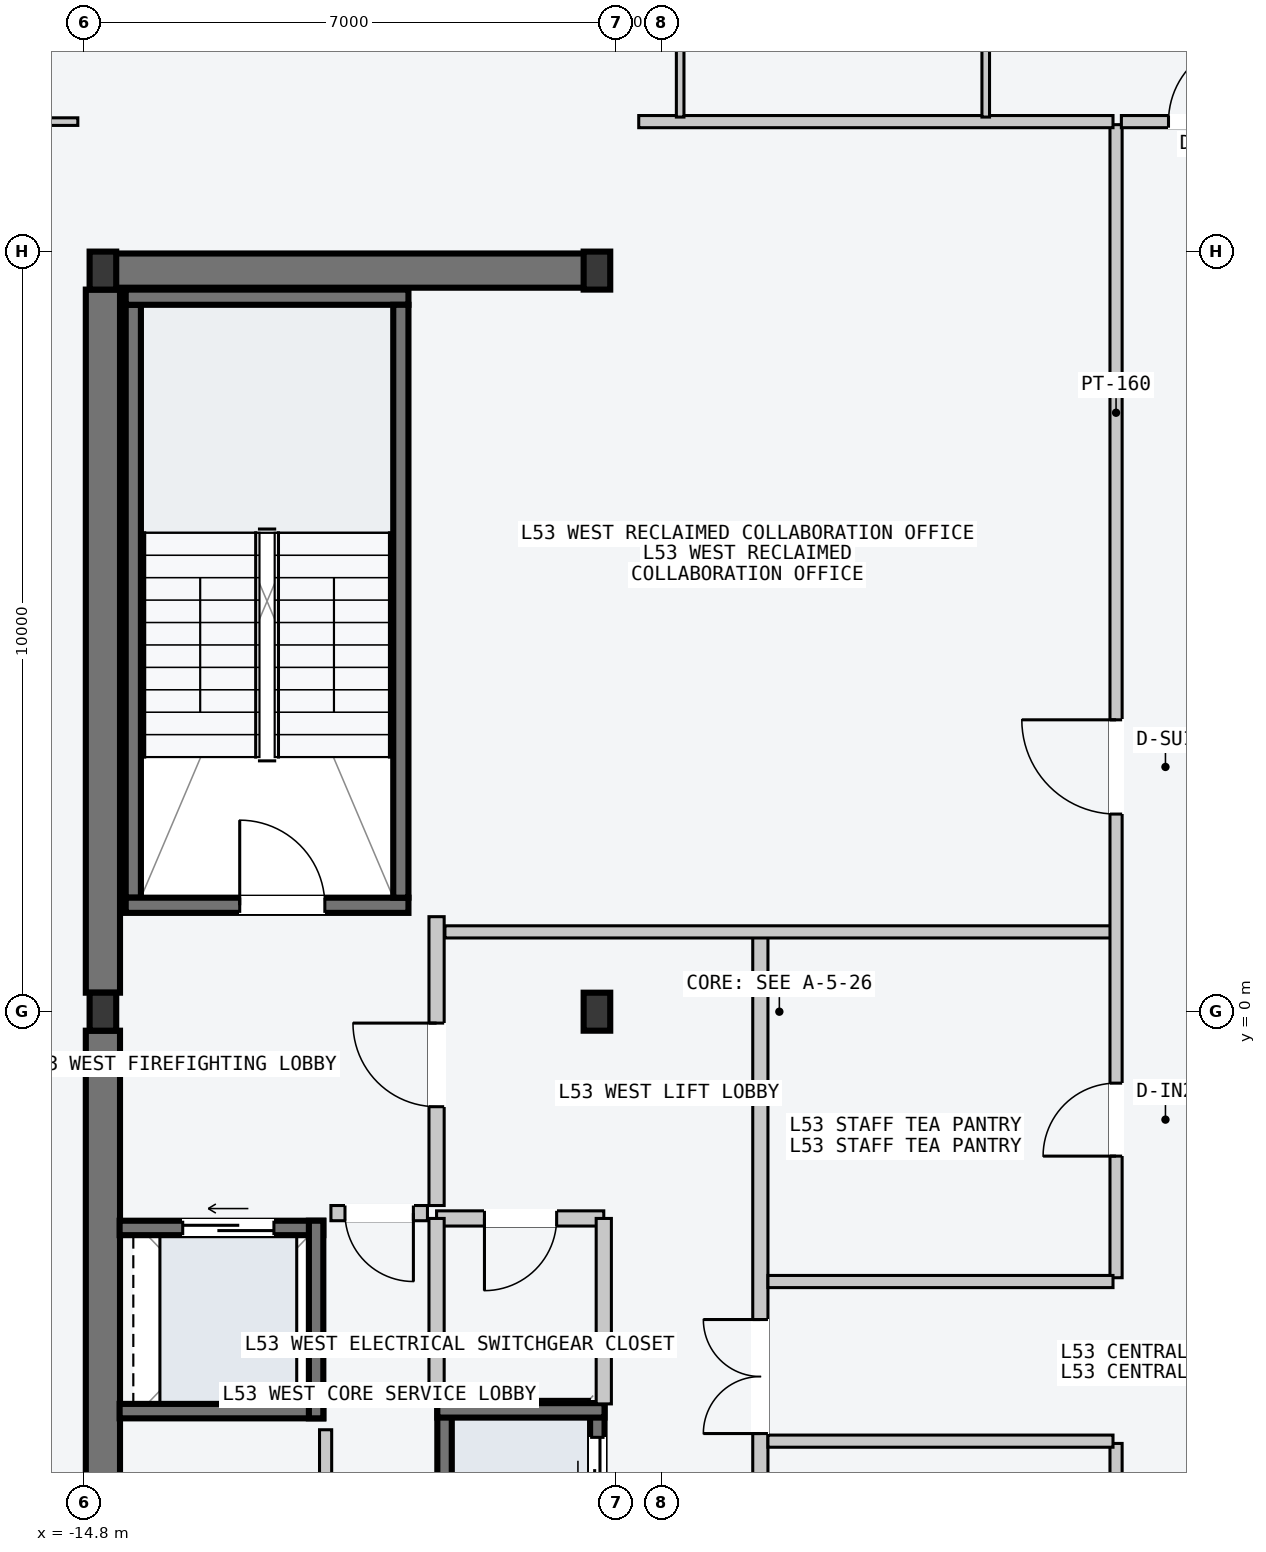
"""IFC4 building model, lengths in metres.
Left out: names, types, materials, properties, quantities, classifications, styles, units other than length and angle.
Written with IfcOpenShell. Run it as: python <this file> out.ifc"""

import sys

from ifc_helpers import new_model, si_unit, direction, frame, frame_2d, origin, origin_2d, place, context, subcontext, project, spatial, rectangle, i_section, extrude, element, fill, save


model = new_model("IFC4")
c1 = context("Model", 3, precision=1e-05, world=origin(), true_north=direction((0.0, 1.0)))
c2 = subcontext(c1, "Body", "Model", "MODEL_VIEW")
j1 = project(units=[si_unit("LENGTHUNIT", "METRE"), si_unit("PLANEANGLEUNIT", "RADIAN")], contexts=[c1])
p1 = place(None, origin())
s1 = spatial("IfcSite", under=j1, at=p1, CompositionType="ELEMENT")
p2 = place(p1, origin())
s2 = spatial("IfcBuilding", under=s1, at=p2, CompositionType="ELEMENT")
p3 = place(p2, frame((0.0, 0.0, 201.9)))
s3 = spatial("IfcBuildingStorey", under=s2, at=p3, CompositionType="ELEMENT", Elevation=201.9)
p4 = place(p3, frame((-14.53, 9.75, -0.2), z_axis=(0.0, 0.0, 1.0), x_axis=(1.0, 0.0, 0.0)))
e1 = element("IfcWall", 1, at=p4, inside=s3, PredefinedType="SHEAR", context=c2, shape_type="SweptSolid", body=[
    extrude(rectangle(XDim=6.46, YDim=0.45, at=frame_2d((3.23, 0.0))), origin(), (0.0, 0.0, 1.0), 3.6),
])
for number, where, z_axis, x_axis in (
    (2, (-14.55, -9.5, -0.2), (0.0, 0.0, 1.0), (0.0, 1.0, 0.0)),
    (3, (-14.55, 0.25, -0.2), (0.0, 0.0, 1.0), (0.0, 1.0, 0.0)),
):
    element("IfcWall", number, at=place(p3, frame(where, z_axis=z_axis, x_axis=x_axis)), inside=s3, PredefinedType="SHEAR", context=c2, shape_type="SweptSolid", body=[
        extrude(rectangle(XDim=9.25, YDim=0.45, at=frame_2d((4.625, 0.0))), origin(), (0.0, 0.0, 1.0), 3.6),
    ])
p5 = place(p3, frame((-14.15, 1.5, -0.2), z_axis=(0.0, 0.0, 1.0), x_axis=(0.0, 1.0, 0.0)))
e4 = element("IfcWall", 4, at=p5, inside=s3, PredefinedType="SOLIDWALL", context=c2, shape_type="SweptSolid", body=[
    extrude(rectangle(XDim=7.8, YDim=0.2, at=frame_2d((3.9, 0.0))), origin(), (0.0, 0.0, 1.0), 3.6),
])
p6 = place(p3, frame((-14.25, 1.4, -0.2), z_axis=(0.0, 0.0, 1.0), x_axis=(1.0, 0.0, 0.0)))
e5 = element("IfcWall", 5, at=p6, inside=s3, PredefinedType="SOLIDWALL", context=c2, shape_type="SweptSolid", body=[
    extrude(rectangle(XDim=3.72, YDim=0.2, at=frame_2d((1.86, 0.0))), origin(), (0.0, 0.0, 1.0), 3.6),
])
p7 = place(p6, frame((1.5, 0.0, 0.2)))
e6 = element("IfcOpeningElement", 6, at=p7, cuts=e5, PredefinedType="OPENING", context=c2, shape_type="SweptSolid", body=[
    extrude(rectangle(XDim=1.12, YDim=2.18, at=frame_2d((0.56, 1.09))), frame((0.0, 0.11, 0.0), z_axis=(0.0, -1.0, 0.0), x_axis=(1.0, 0.0, 0.0)), (0.0, 0.0, 1.0), 0.22),
])
p8 = place(p3, frame((-14.25, 9.4, -0.2), z_axis=(0.0, 0.0, 1.0), x_axis=(1.0, 0.0, 0.0)))
e7 = element("IfcWall", 7, at=p8, inside=s3, PredefinedType="SOLIDWALL", context=c2, shape_type="SweptSolid", body=[
    extrude(rectangle(XDim=3.72, YDim=0.2, at=frame_2d((1.86, 0.0))), origin(), (0.0, 0.0, 1.0), 3.6),
])
p9 = place(p3, frame((-10.63, 1.5, -0.2), z_axis=(0.0, 0.0, 1.0), x_axis=(0.0, 1.0, 0.0)))
e8 = element("IfcWall", 8, at=p9, inside=s3, PredefinedType="SOLIDWALL", context=c2, shape_type="SweptSolid", body=[
    extrude(rectangle(XDim=7.8, YDim=0.2, at=frame_2d((3.9, 0.0))), origin(), (0.0, 0.0, 1.0), 3.6),
])
for number, where, z_axis, x_axis in (
    (9, (-14.55, 0.0, 0.0), (0.0, 0.0, 1.0), (1.0, 0.0, 0.0)),
    (10, (-14.55, 9.75, 0.0), (0.0, 0.0, 1.0), (1.0, 0.0, 0.0)),
    (11, (-8.05, 0.0, 0.0), (0.0, 0.0, 1.0), (1.0, 0.0, 0.0)),
    (12, (-8.05, 9.75, 0.0), (0.0, 0.0, 1.0), (1.0, 0.0, 0.0)),
):
    element("IfcColumn", number, at=place(p3, frame(where, z_axis=z_axis, x_axis=x_axis)), inside=s3, PredefinedType="COLUMN", context=c2, shape_type="SweptSolid", body=[
        extrude(i_section(OverallWidth=0.35, OverallDepth=0.5, WebThickness=0.02, FlangeThickness=0.032, at=origin_2d()), origin(), (0.0, 0.0, 1.0), 3.6),
    ])
p10 = place(p3, frame((-8.045, -7.15, -0.2), z_axis=(0.0, 0.0, 1.0), x_axis=(0.0, 1.0, 0.0)))
e13 = element("IfcWall", 13, at=p10, inside=s3, PredefinedType="SOLIDWALL", context=c2, shape_type="SweptSolid", body=[
    extrude(rectangle(XDim=2.0, YDim=0.19, at=frame_2d((1.0, 0.0))), origin(), (0.0, 0.0, 1.0), 3.6),
])
p11 = place(p10, frame((0.45, 0.0, 0.2)))
e14 = element("IfcOpeningElement", 14, at=p11, cuts=e13, PredefinedType="OPENING", context=c2, shape_type="SweptSolid", body=[
    extrude(rectangle(XDim=1.1, YDim=2.2, at=frame_2d((0.55, 1.1))), frame((0.0, 0.105, 0.0), z_axis=(0.0, -1.0, 0.0), x_axis=(1.0, 0.0, 0.0)), (0.0, 0.0, 1.0), 0.21),
])
p12 = place(p3, frame((-10.055, -7.15, -0.2), z_axis=(0.0, 0.0, 1.0), x_axis=(0.0, 1.0, 0.0)))
e15 = element("IfcWall", 15, at=p12, inside=s3, PredefinedType="SOLIDWALL", context=c2, shape_type="SweptSolid", body=[
    extrude(rectangle(XDim=2.0, YDim=0.19, at=frame_2d((1.0, 0.0))), origin(), (0.0, 0.0, 1.0), 3.6),
])
p13 = place(p3, frame((-10.15, -5.245, -0.2), z_axis=(0.0, 0.0, 1.0), x_axis=(1.0, 0.0, 0.0)))
e16 = element("IfcWall", 16, at=p13, inside=s3, PredefinedType="SOLIDWALL", context=c2, shape_type="SweptSolid", body=[
    extrude(rectangle(XDim=2.2, YDim=0.19, at=frame_2d((1.1, 0.0))), origin(), (0.0, 0.0, 1.0), 3.6),
])
p14 = place(p3, frame((-14.33, -2.845, -0.2), z_axis=(0.0, 0.0, 1.0), x_axis=(1.0, 0.0, 0.0)))
e17 = element("IfcWall", 17, at=p14, inside=s3, PredefinedType="SOLIDWALL", context=c2, shape_type="SweptSolid", body=[
    extrude(rectangle(XDim=2.68, YDim=0.19, at=frame_2d((1.34, 0.0))), origin(), (0.0, 0.0, 1.0), 3.6),
])
p15 = place(p14, frame((0.83, 0.0, 0.2)))
e18 = element("IfcOpeningElement", 18, at=p15, cuts=e17, PredefinedType="OPENING", context=c2, shape_type="SweptSolid", body=[
    extrude(rectangle(XDim=1.2, YDim=2.2, at=frame_2d((0.6, 1.1))), frame((0.0, 0.105, 0.0), z_axis=(0.0, -1.0, 0.0), x_axis=(1.0, 0.0, 0.0)), (0.0, 0.0, 1.0), 0.21),
])
p16 = place(p3, frame((-14.33, -5.255, -0.2), z_axis=(0.0, 0.0, 1.0), x_axis=(1.0, 0.0, 0.0)))
e19 = element("IfcWall", 19, at=p16, inside=s3, PredefinedType="SOLIDWALL", context=c2, shape_type="SweptSolid", body=[
    extrude(rectangle(XDim=2.68, YDim=0.19, at=frame_2d((1.34, 0.0))), origin(), (0.0, 0.0, 1.0), 3.6),
])
p17 = place(p3, frame((-11.745, -5.35, -0.2), z_axis=(0.0, 0.0, 1.0), x_axis=(0.0, 1.0, 0.0)))
e20 = element("IfcWall", 20, at=p17, inside=s3, PredefinedType="SOLIDWALL", context=c2, shape_type="SweptSolid", body=[
    extrude(rectangle(XDim=2.6, YDim=0.19, at=frame_2d((1.3, 0.0))), origin(), (0.0, 0.0, 1.0), 3.6),
])
p18 = place(p3, frame((-5.9, -9.45, 0.0), z_axis=(0.0, 0.0, 1.0), x_axis=(0.0, 1.0, 0.0)))
e21 = element("IfcWall", 21, at=p18, inside=s3, PredefinedType="PARTITIONING", context=c2, shape_type="SweptSolid", body=[
    extrude(rectangle(XDim=10.5, YDim=0.2, at=frame_2d((5.25, 0.0))), origin(), (0.0, 0.0, 1.0), 3.4),
])
p19 = place(p18, frame((3.9, 0.0, 0.0)))
e22 = element("IfcOpeningElement", 22, at=p19, cuts=e21, PredefinedType="OPENING", context=c2, shape_type="SweptSolid", body=[
    extrude(rectangle(XDim=1.5, YDim=2.2, at=frame_2d((0.75, 1.1))), frame((0.0, 0.11, 0.0), z_axis=(0.0, -1.0, 0.0), x_axis=(1.0, 0.0, 0.0)), (0.0, 0.0, 1.0), 0.22),
])
p20 = place(p3, frame((-10.16, -2.55, 0.0), z_axis=(0.0, 0.0, 1.0), x_axis=(0.0, 1.0, 0.0)))
e23 = element("IfcWall", 23, at=p20, inside=s3, PredefinedType="PARTITIONING", context=c2, shape_type="SweptSolid", body=[
    extrude(rectangle(XDim=3.8, YDim=0.2, at=frame_2d((1.9, 0.0))), origin(), (0.0, 0.0, 1.0), 3.4),
])
p21 = place(p20, frame((1.3, 0.0, 0.0)))
e24 = element("IfcOpeningElement", 24, at=p21, cuts=e23, PredefinedType="OPENING", context=c2, shape_type="SweptSolid", body=[
    extrude(rectangle(XDim=1.1, YDim=2.15, at=frame_2d((0.55, 1.075))), frame((0.0, 0.11, 0.0), z_axis=(0.0, -1.0, 0.0), x_axis=(1.0, 0.0, 0.0)), (0.0, 0.0, 1.0), 0.22),
])
p22 = place(p3, frame((-10.28, -2.65, 0.0), z_axis=(0.0, 0.0, 1.0), x_axis=(-1.0, 0.0, 0.0)))
e25 = element("IfcWall", 25, at=p22, inside=s3, PredefinedType="PARTITIONING", context=c2, shape_type="SweptSolid", body=[
    extrude(rectangle(XDim=1.27, YDim=0.2, at=frame_2d((0.635, 0.0))), origin(), (0.0, 0.0, 1.0), 3.4),
])
p23 = place(p22, frame((0.185, 0.0, 0.0)))
e26 = element("IfcOpeningElement", 26, at=p23, cuts=e25, PredefinedType="OPENING", context=c2, shape_type="SweptSolid", body=[
    extrude(rectangle(XDim=0.9, YDim=2.15, at=frame_2d((0.45, 1.075))), frame((0.0, 0.11, 0.0), z_axis=(0.0, -1.0, 0.0), x_axis=(1.0, 0.0, 0.0)), (0.0, 0.0, 1.0), 0.22),
])
p24 = place(p3, frame((-7.96, -2.72, 0.0), z_axis=(0.0, 0.0, 1.0), x_axis=(-1.0, 0.0, 0.0)))
e27 = element("IfcWall", 27, at=p24, inside=s3, PredefinedType="PARTITIONING", context=c2, shape_type="SweptSolid", body=[
    extrude(rectangle(XDim=2.2, YDim=0.2, at=frame_2d((1.1, 0.0))), origin(), (0.0, 0.0, 1.0), 3.4),
])
p25 = place(p24, frame((0.62, 0.0, 0.0)))
e28 = element("IfcOpeningElement", 28, at=p25, cuts=e27, PredefinedType="OPENING", context=c2, shape_type="SweptSolid", body=[
    extrude(rectangle(XDim=0.95, YDim=2.1, at=frame_2d((0.475, 1.05))), frame((0.0, 0.11, 0.0), z_axis=(0.0, -1.0, 0.0), x_axis=(1.0, 0.0, 0.0)), (0.0, 0.0, 1.0), 0.22),
])
for number, where, z_axis, x_axis in (
    (29, (-7.96, -5.16, 0.0), (0.0, 0.0, 1.0), (0.0, 1.0, 0.0)),
    (30, (-10.16, -5.16, 0.0), (0.0, 0.0, 1.0), (0.0, 1.0, 0.0)),
):
    element("IfcWall", number, at=place(p3, frame(where, z_axis=z_axis, x_axis=x_axis)), inside=s3, PredefinedType="PARTITIONING", context=c2, shape_type="SweptSolid", body=[
        extrude(rectangle(XDim=2.44, YDim=0.2, at=frame_2d((1.22, 0.0))), origin(), (0.0, 0.0, 1.0), 3.4),
    ])
p26 = place(p3, frame((-11.62, -9.35, 0.0), z_axis=(0.0, 0.0, 1.0), x_axis=(0.0, 1.0, 0.0)))
e31 = element("IfcWall", 31, at=p26, inside=s3, PredefinedType="PARTITIONING", context=c2, shape_type="SweptSolid", body=[
    extrude(rectangle(XDim=3.85, YDim=0.16, at=frame_2d((1.925, 0.0))), origin(), (0.0, 0.0, 1.0), 3.4),
])
p27 = place(p26, frame((1.475, 0.0, 0.0)))
e32 = element("IfcOpeningElement", 32, at=p27, cuts=e31, PredefinedType="OPENING", context=c2, shape_type="SweptSolid", body=[
    extrude(rectangle(XDim=0.9, YDim=2.15, at=frame_2d((0.45, 1.075))), frame((0.0, 0.09, 0.0), z_axis=(0.0, -1.0, 0.0), x_axis=(1.0, 0.0, 0.0)), (0.0, 0.0, 1.0), 0.18),
])
p28 = place(p3, frame((-10.05, 1.05, 0.0), z_axis=(0.0, 0.0, 1.0), x_axis=(1.0, 0.0, 0.0)))
e33 = element("IfcWall", 33, at=p28, inside=s3, PredefinedType="PARTITIONING", context=c2, shape_type="SweptSolid", body=[
    extrude(rectangle(XDim=8.79, YDim=0.16, at=frame_2d((4.395, 0.0))), origin(), (0.0, 0.0, 1.0), 3.4),
])
p29 = place(p3, frame((-1.22, -3.5, 0.0), z_axis=(0.0, 0.0, 1.0), x_axis=(0.0, 1.0, 0.0)))
e34 = element("IfcWall", 34, at=p29, inside=s3, PredefinedType="PARTITIONING", context=c2, shape_type="SweptSolid", body=[
    extrude(rectangle(XDim=15.17, YDim=0.16, at=frame_2d((7.585, 0.0))), origin(), (0.0, 0.0, 1.0), 3.4),
])
p30 = place(p29, frame((6.1, 0.0, 0.0)))
e35 = element("IfcOpeningElement", 35, at=p30, cuts=e34, PredefinedType="OPENING", context=c2, shape_type="SweptSolid", body=[
    extrude(rectangle(XDim=1.24, YDim=2.24, at=frame_2d((0.62, 1.12))), frame((0.0, 0.09, 0.0), z_axis=(0.0, -1.0, 0.0), x_axis=(1.0, 0.0, 0.0)), (0.0, 0.0, 1.0), 0.18),
])
p31 = place(p29, frame((1.6, 0.0, 0.0)))
e36 = element("IfcOpeningElement", 36, at=p31, cuts=e34, PredefinedType="OPENING", context=c2, shape_type="SweptSolid", body=[
    extrude(rectangle(XDim=0.96, YDim=2.18, at=frame_2d((0.48, 1.09))), frame((0.0, 0.09, 0.0), z_axis=(0.0, -1.0, 0.0), x_axis=(1.0, 0.0, 0.0)), (0.0, 0.0, 1.0), 0.18),
])
p32 = place(p3, frame((-7.5, 11.71, 0.0), z_axis=(0.0, 0.0, 1.0), x_axis=(1.0, 0.0, 0.0)))
e37 = element("IfcWall", 37, at=p32, inside=s3, PredefinedType="PARTITIONING", context=c2, shape_type="SweptSolid", body=[
    extrude(rectangle(XDim=6.24, YDim=0.16, at=frame_2d((3.12, 0.0))), origin(), (0.0, 0.0, 1.0), 3.4),
])
p33 = place(p3, frame((-5.8, -3.55, 0.0), z_axis=(0.0, 0.0, 1.0), x_axis=(1.0, 0.0, 0.0)))
e38 = element("IfcWall", 38, at=p33, inside=s3, PredefinedType="PARTITIONING", context=c2, shape_type="SweptSolid", body=[
    extrude(rectangle(XDim=4.54, YDim=0.16, at=frame_2d((2.27, 0.0))), origin(), (0.0, 0.0, 1.0), 3.4),
])
p34 = place(p3, frame((-1.22, -11.67, 0.0), z_axis=(0.0, 0.0, 1.0), x_axis=(0.0, 1.0, 0.0)))
e39 = element("IfcWall", 39, at=p34, inside=s3, PredefinedType="PARTITIONING", context=c2, shape_type="SweptSolid", body=[
    extrude(rectangle(XDim=5.99, YDim=0.16, at=frame_2d((2.995, 0.0))), origin(), (0.0, 0.0, 1.0), 3.4),
])
p35 = place(p34, frame((1.15, 0.0, 0.0)))
e40 = element("IfcOpeningElement", 40, at=p35, cuts=e39, PredefinedType="OPENING", context=c2, shape_type="SweptSolid", body=[
    extrude(rectangle(XDim=0.96, YDim=2.18, at=frame_2d((0.48, 1.09))), frame((0.0, 0.09, 0.0), z_axis=(0.0, -1.0, 0.0), x_axis=(1.0, 0.0, 0.0)), (0.0, 0.0, 1.0), 0.18),
])
p36 = place(p3, frame((-5.8, -5.65, 0.0), z_axis=(0.0, 0.0, 1.0), x_axis=(1.0, 0.0, 0.0)))
e41 = element("IfcWall", 41, at=p36, inside=s3, PredefinedType="PARTITIONING", context=c2, shape_type="SweptSolid", body=[
    extrude(rectangle(XDim=4.54, YDim=0.16, at=frame_2d((2.27, 0.0))), origin(), (0.0, 0.0, 1.0), 3.4),
])
p37 = place(p3, frame((-6.955, 11.77, 0.0), z_axis=(0.0, 0.0, 1.0), x_axis=(0.0, 1.0, 0.0)))
e42 = element("IfcWall", 42, at=p37, inside=s3, PredefinedType="PARTITIONING", context=c2, shape_type="SweptSolid", body=[
    extrude(rectangle(XDim=6.79, YDim=0.1, at=frame_2d((3.395, 0.0))), origin(), (0.0, 0.0, 1.0), 3.4),
])
p38 = place(p37, frame((1.15, 0.0, 0.0)))
e43 = element("IfcOpeningElement", 43, at=p38, cuts=e42, PredefinedType="OPENING", context=c2, shape_type="SweptSolid", body=[
    extrude(rectangle(XDim=0.96, YDim=2.18, at=frame_2d((0.48, 1.09))), frame((0.0, 0.06, 0.0), z_axis=(0.0, -1.0, 0.0), x_axis=(1.0, 0.0, 0.0)), (0.0, 0.0, 1.0), 0.12),
])
p39 = place(p3, frame((-2.935, 11.77, 0.0), z_axis=(0.0, 0.0, 1.0), x_axis=(0.0, 1.0, 0.0)))
e44 = element("IfcWall", 44, at=p39, inside=s3, PredefinedType="PARTITIONING", context=c2, shape_type="SweptSolid", body=[
    extrude(rectangle(XDim=6.79, YDim=0.1, at=frame_2d((3.395, 0.0))), origin(), (0.0, 0.0, 1.0), 3.4),
])
p40 = place(p39, frame((1.15, 0.0, 0.0)))
e45 = element("IfcOpeningElement", 45, at=p40, cuts=e44, PredefinedType="OPENING", context=c2, shape_type="SweptSolid", body=[
    extrude(rectangle(XDim=0.96, YDim=2.18, at=frame_2d((0.48, 1.09))), frame((0.0, 0.06, 0.0), z_axis=(0.0, -1.0, 0.0), x_axis=(1.0, 0.0, 0.0)), (0.0, 0.0, 1.0), 0.12),
])
p41 = place(p3, frame((-1.15, 11.71, 0.0), z_axis=(0.0, 0.0, 1.0), x_axis=(1.0, 0.0, 0.0)))
e46 = element("IfcWall", 46, at=p41, inside=s3, PredefinedType="PARTITIONING", context=c2, shape_type="SweptSolid", body=[
    extrude(rectangle(XDim=2.3, YDim=0.16, at=frame_2d((1.15, 0.0))), origin(), (0.0, 0.0, 1.0), 3.4),
])
p42 = place(p41, frame((0.62, 0.0, 0.0)))
e47 = element("IfcOpeningElement", 47, at=p42, cuts=e46, PredefinedType="OPENING", context=c2, shape_type="SweptSolid", body=[
    extrude(rectangle(XDim=1.06, YDim=2.2, at=frame_2d((0.53, 1.1))), frame((0.0, 0.09, 0.0), z_axis=(0.0, -1.0, 0.0), x_axis=(1.0, 0.0, 0.0)), (0.0, 0.0, 1.0), 0.18),
])
p43 = place(p3, frame((-20.56, 11.71, 0.0), z_axis=(0.0, 0.0, 1.0), x_axis=(1.0, 0.0, 0.0)))
e48 = element("IfcWall", 48, at=p43, inside=s3, PredefinedType="PARTITIONING", context=c2, shape_type="SweptSolid", body=[
    extrude(rectangle(XDim=5.68, YDim=0.1, at=frame_2d((2.84, 0.0))), origin(), (0.0, 0.0, 1.0), 3.4),
])
p44 = place(p43, frame((2.22, 0.0, 0.0)))
e49 = element("IfcOpeningElement", 49, at=p44, cuts=e48, PredefinedType="OPENING", context=c2, shape_type="SweptSolid", body=[
    extrude(rectangle(XDim=1.24, YDim=2.24, at=frame_2d((0.62, 1.12))), frame((0.0, 0.06, 0.0), z_axis=(0.0, -1.0, 0.0), x_axis=(1.0, 0.0, 0.0)), (0.0, 0.0, 1.0), 0.12),
])
p45 = place(p7, origin())
e50 = element("IfcDoor", 50, at=p45, inside=s3, OperationType="SINGLE_SWING_LEFT", PredefinedType="DOOR", context=c2, shape_type="SweptSolid", body=[
    extrude(rectangle(XDim=1.12, YDim=2.18, at=frame_2d((0.56, 1.09))), frame((0.0, 0.025, 0.0), z_axis=(0.0, -1.0, 0.0), x_axis=(1.0, 0.0, 0.0)), (0.0, 0.0, 1.0), 0.05),
])
fill(e6, e50)
p46 = place(p11, origin())
e51 = element("IfcDoor", 51, at=p46, inside=s3, OperationType="SLIDING_TO_LEFT", PredefinedType="DOOR", context=c2, shape_type="SweptSolid", body=[
    extrude(rectangle(XDim=1.1, YDim=2.2, at=frame_2d((0.55, 1.1))), frame((0.0, 0.025, 0.0), z_axis=(0.0, -1.0, 0.0), x_axis=(1.0, 0.0, 0.0)), (0.0, 0.0, 1.0), 0.05),
])
fill(e14, e51)
p47 = place(p15, origin())
e52 = element("IfcDoor", 52, at=p47, inside=s3, OperationType="SLIDING_TO_LEFT", PredefinedType="DOOR", context=c2, shape_type="SweptSolid", body=[
    extrude(rectangle(XDim=1.2, YDim=2.2, at=frame_2d((0.6, 1.1))), frame((0.0, 0.025, 0.0), z_axis=(0.0, -1.0, 0.0), x_axis=(1.0, 0.0, 0.0)), (0.0, 0.0, 1.0), 0.05),
])
fill(e18, e52)
p48 = place(p19, origin())
e53 = element("IfcDoor", 53, at=p48, inside=s3, OperationType="DOUBLE_DOOR_SINGLE_SWING", PredefinedType="DOOR", context=c2, shape_type="SweptSolid", body=[
    extrude(rectangle(XDim=1.5, YDim=2.2, at=frame_2d((0.75, 1.1))), frame((0.0, 0.025, 0.0), z_axis=(0.0, -1.0, 0.0), x_axis=(1.0, 0.0, 0.0)), (0.0, 0.0, 1.0), 0.05),
])
fill(e22, e53)
p49 = place(p21, origin())
e54 = element("IfcDoor", 54, at=p49, inside=s3, OperationType="SINGLE_SWING_RIGHT", PredefinedType="DOOR", context=c2, shape_type="SweptSolid", body=[
    extrude(rectangle(XDim=1.1, YDim=2.15, at=frame_2d((0.55, 1.075))), frame((0.0, 0.025, 0.0), z_axis=(0.0, -1.0, 0.0), x_axis=(1.0, 0.0, 0.0)), (0.0, 0.0, 1.0), 0.05),
])
fill(e24, e54)
p50 = place(p23, origin())
e55 = element("IfcDoor", 55, at=p50, inside=s3, OperationType="SINGLE_SWING_LEFT", PredefinedType="DOOR", context=c2, shape_type="SweptSolid", body=[
    extrude(rectangle(XDim=0.9, YDim=2.15, at=frame_2d((0.45, 1.075))), frame((0.0, 0.025, 0.0), z_axis=(0.0, -1.0, 0.0), x_axis=(1.0, 0.0, 0.0)), (0.0, 0.0, 1.0), 0.05),
])
fill(e26, e55)
p51 = place(p25, origin())
e56 = element("IfcDoor", 56, at=p51, inside=s3, OperationType="SINGLE_SWING_RIGHT", PredefinedType="DOOR", context=c2, shape_type="SweptSolid", body=[
    extrude(rectangle(XDim=0.95, YDim=2.1, at=frame_2d((0.475, 1.05))), frame((0.0, 0.025, 0.0), z_axis=(0.0, -1.0, 0.0), x_axis=(1.0, 0.0, 0.0)), (0.0, 0.0, 1.0), 0.05),
])
fill(e28, e56)
p52 = place(p30, origin())
e57 = element("IfcDoor", 57, at=p52, inside=s3, OperationType="SINGLE_SWING_RIGHT", PredefinedType="DOOR", context=c2, shape_type="SweptSolid", body=[
    extrude(rectangle(XDim=1.24, YDim=2.24, at=frame_2d((0.62, 1.12))), frame((0.0, 0.025, 0.0), z_axis=(0.0, -1.0, 0.0), x_axis=(1.0, 0.0, 0.0)), (0.0, 0.0, 1.0), 0.05),
])
fill(e35, e57)
p53 = place(p31, origin())
e58 = element("IfcDoor", 58, at=p53, inside=s3, OperationType="SINGLE_SWING_LEFT", PredefinedType="DOOR", context=c2, shape_type="SweptSolid", body=[
    extrude(rectangle(XDim=0.96, YDim=2.18, at=frame_2d((0.48, 1.09))), frame((0.0, 0.025, 0.0), z_axis=(0.0, -1.0, 0.0), x_axis=(1.0, 0.0, 0.0)), (0.0, 0.0, 1.0), 0.05),
])
fill(e36, e58)
p54 = place(p42, origin())
e59 = element("IfcDoor", 59, at=p54, inside=s3, OperationType="SINGLE_SWING_RIGHT", PredefinedType="DOOR", context=c2, shape_type="SweptSolid", body=[
    extrude(rectangle(XDim=1.06, YDim=2.2, at=frame_2d((0.53, 1.1))), frame((0.0, 0.025, 0.0), z_axis=(0.0, -1.0, 0.0), x_axis=(1.0, 0.0, 0.0)), (0.0, 0.0, 1.0), 0.05),
])
fill(e47, e59)
save(model, sys.argv[1])
